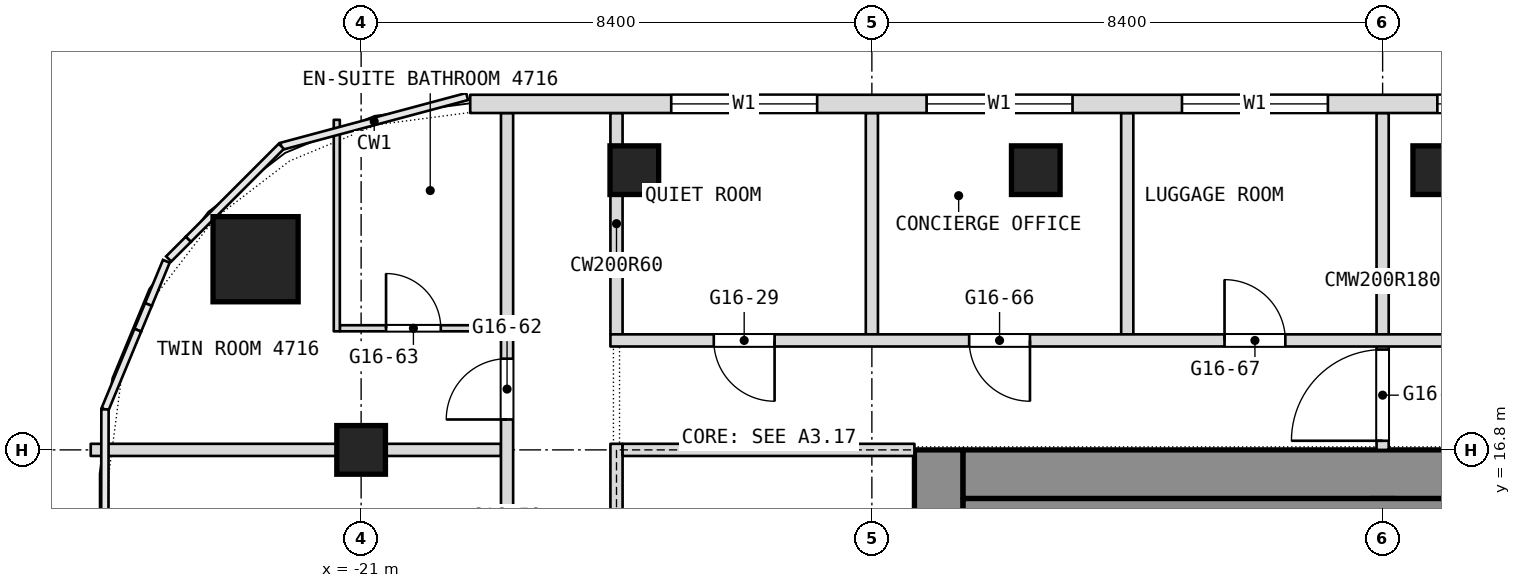
"""IFC4 building model, lengths in metres.
Left out: names, types, materials, properties, quantities, classifications, styles, units other than length and angle.
Written with IfcOpenShell. Run it as: python <this file> out.ifc"""

import sys

from ifc_helpers import new_model, si_unit, direction, frame, frame_2d, origin, origin_2d, place, context, subcontext, project, spatial, rectangle, extrude, element, fill, save


model = new_model("IFC4")
c1 = context("Model", 3, precision=1e-05, world=origin(), true_north=direction((0.0, 1.0)))
c2 = subcontext(c1, "Body", "Model", "MODEL_VIEW")
j1 = project(units=[si_unit("LENGTHUNIT", "METRE"), si_unit("PLANEANGLEUNIT", "RADIAN")], contexts=[c1])
p1 = place(None, origin())
s1 = spatial("IfcSite", under=j1, at=p1, CompositionType="ELEMENT")
p2 = place(p1, origin())
s2 = spatial("IfcBuilding", under=s1, at=p2, CompositionType="ELEMENT")
p3 = place(p2, frame((0.0, 0.0, 205.7)))
s3 = spatial("IfcBuildingStorey", under=s2, at=p3, CompositionType="ELEMENT", Elevation=205.7)
p4 = place(p3, frame((-11.5, 0.0, 0.0), z_axis=(0.0, 0.0, 1.0), x_axis=(0.0, 1.0, 0.0)))
e1 = element("IfcWall", 1, at=p4, inside=s3, PredefinedType="SHEAR", context=c2, shape_type="SweptSolid", body=[
    extrude(rectangle(XDim=16.8, YDim=0.8, at=frame_2d((8.4, 0.0))), origin(), (0.0, 0.0, 1.0), 3.6),
])
p5 = place(p4, frame((3.6, 0.0, 0.0)))
e2 = element("IfcOpeningElement", 2, at=p5, cuts=e1, PredefinedType="OPENING", context=c2, shape_type="SweptSolid", body=[
    extrude(rectangle(XDim=0.9, YDim=2.1, at=frame_2d((0.45, 1.05))), frame((0.0, 0.4, 0.0), z_axis=(0.0, -1.0, 0.0), x_axis=(1.0, 0.0, 0.0)), (0.0, 0.0, 1.0), 0.8),
])
p6 = place(p4, frame((6.825, 0.0, 0.0)))
e3 = element("IfcOpeningElement", 3, at=p6, cuts=e1, PredefinedType="OPENING", context=c2, shape_type="SweptSolid", body=[
    extrude(rectangle(XDim=1.2, YDim=2.1, at=frame_2d((0.6, 1.05))), frame((0.0, 0.4, 0.0), z_axis=(0.0, -1.0, 0.0), x_axis=(1.0, 0.0, 0.0)), (0.0, 0.0, 1.0), 0.8),
])
p7 = place(p4, frame((14.062, 0.0, 0.0)))
e4 = element("IfcOpeningElement", 4, at=p7, cuts=e1, PredefinedType="OPENING", context=c2, shape_type="SweptSolid", body=[
    extrude(rectangle(XDim=0.9, YDim=2.1, at=frame_2d((0.45, 1.05))), frame((0.0, 0.4, 0.0), z_axis=(0.0, -1.0, 0.0), x_axis=(1.0, 0.0, 0.0)), (0.0, 0.0, 1.0), 0.8),
])
p8 = place(p4, frame((11.438, 0.0, 0.0)))
e5 = element("IfcOpeningElement", 5, at=p8, cuts=e1, PredefinedType="OPENING", context=c2, shape_type="SweptSolid", body=[
    extrude(rectangle(XDim=0.9, YDim=2.1, at=frame_2d((0.45, 1.05))), frame((0.0, 0.4, 0.0), z_axis=(0.0, -1.0, 0.0), x_axis=(1.0, 0.0, 0.0)), (0.0, 0.0, 1.0), 0.8),
])
p9 = place(p4, frame((8.775, 0.0, 0.0)))
e6 = element("IfcOpeningElement", 6, at=p9, cuts=e1, PredefinedType="OPENING", context=c2, shape_type="SweptSolid", body=[
    extrude(rectangle(XDim=1.2, YDim=2.1, at=frame_2d((0.6, 1.05))), frame((0.0, 0.4, 0.0), z_axis=(0.0, -1.0, 0.0), x_axis=(1.0, 0.0, 0.0)), (0.0, 0.0, 1.0), 0.8),
])
p10 = place(p3, frame((-11.1, 16.4, 0.0), z_axis=(0.0, 0.0, 1.0), x_axis=(1.0, 0.0, 0.0)))
e7 = element("IfcWall", 7, at=p10, inside=s3, PredefinedType="SHEAR", context=c2, shape_type="SweptSolid", body=[
    extrude(rectangle(XDim=22.2, YDim=0.8, at=frame_2d((11.1, 0.0))), origin(), (0.0, 0.0, 1.0), 3.6),
])
p11 = place(p3, frame((-4.2, 0.8, 0.0), z_axis=(0.0, 0.0, 1.0), x_axis=(0.0, 1.0, 0.0)))
e8 = element("IfcWall", 8, at=p11, inside=s3, PredefinedType="SHEAR", context=c2, shape_type="SweptSolid", body=[
    extrude(rectangle(XDim=15.2, YDim=0.4, at=frame_2d((7.6, 0.0))), origin(), (0.0, 0.0, 1.0), 3.6),
])
p12 = place(p11, frame((8.5, 0.0, 0.0)))
e9 = element("IfcOpeningElement", 9, at=p12, cuts=e8, PredefinedType="OPENING", context=c2, shape_type="SweptSolid", body=[
    extrude(rectangle(XDim=1.2, YDim=2.1, at=frame_2d((0.6, 1.05))), frame((0.0, 0.2, 0.0), z_axis=(0.0, -1.0, 0.0), x_axis=(1.0, 0.0, 0.0)), (0.0, 0.0, 1.0), 0.4),
])
p13 = place(p3, frame((-22.736, 19.936, 0.0), z_axis=(0.0, 0.0, 1.0), x_axis=(1.0, 0.0, 0.0)))
e10 = element("IfcColumn", 10, at=p13, inside=s3, PredefinedType="COLUMN", context=c2, shape_type="SweptSolid", body=[
    extrude(rectangle(XDim=1.4, YDim=1.4, at=origin_2d()), origin(), (0.0, 0.0, 1.0), 3.6),
])
for number, where, z_axis, x_axis in (
    (11, (-21.0, 16.8, 0.0), (0.0, 0.0, 1.0), (1.0, 0.0, 0.0)),
    (12, (-16.507, 21.4, 0.0), (0.0, 0.0, 1.0), (1.0, 0.0, 0.0)),
    (13, (-9.904, 21.4, 0.0), (0.0, 0.0, 1.0), (1.0, 0.0, 0.0)),
    (14, (-3.302, 21.4, 0.0), (0.0, 0.0, 1.0), (1.0, 0.0, 0.0)),
):
    element("IfcColumn", number, at=place(p3, frame(where, z_axis=z_axis, x_axis=x_axis)), inside=s3, PredefinedType="COLUMN", context=c2, shape_type="SweptSolid", body=[
        extrude(rectangle(XDim=0.8, YDim=0.8, at=origin_2d()), origin(), (0.0, 0.0, 1.0), 3.6),
    ])
p14 = place(p3, frame((-4.2, 16.8, 0.0), z_axis=(0.0, 0.0, 1.0), x_axis=(0.0, 1.0, 0.0)))
e15 = element("IfcWall", 15, at=p14, inside=s3, PredefinedType="PARTITIONING", context=c2, shape_type="SweptSolid", body=[
    extrude(rectangle(XDim=5.54, YDim=0.2, at=frame_2d((2.77, 0.0))), origin(), (0.0, 0.0, 1.0), 3.34),
])
p15 = place(p14, frame((0.15, 0.0, 0.0)))
e16 = element("IfcOpeningElement", 16, at=p15, cuts=e15, PredefinedType="OPENING", context=c2, shape_type="SweptSolid", body=[
    extrude(rectangle(XDim=1.5, YDim=2.1, at=frame_2d((0.75, 1.05))), frame((0.0, 0.1, 0.0), z_axis=(0.0, -1.0, 0.0), x_axis=(1.0, 0.0, 0.0)), (0.0, 0.0, 1.0), 0.2),
])
for number, where, z_axis, x_axis in (
    (17, (-8.4, 18.7, 0.0), (0.0, 0.0, 1.0), (0.0, 1.0, 0.0)),
    (18, (-12.6, 18.7, 0.0), (0.0, 0.0, 1.0), (0.0, 1.0, 0.0)),
    (19, (-16.8, 18.7, 0.0), (0.0, 0.0, 1.0), (0.0, 1.0, 0.0)),
):
    element("IfcWall", number, at=place(p3, frame(where, z_axis=z_axis, x_axis=x_axis)), inside=s3, PredefinedType="PARTITIONING", context=c2, shape_type="SweptSolid", body=[
        extrude(rectangle(XDim=3.64, YDim=0.2, at=frame_2d((1.82, 0.0))), origin(), (0.0, 0.0, 1.0), 3.34),
    ])
p16 = place(p3, frame((-25.447, 16.8, 0.0), z_axis=(0.0, 0.0, 1.0), x_axis=(1.0, 0.0, 0.0)))
e20 = element("IfcWall", 20, at=p16, inside=s3, PredefinedType="PARTITIONING", context=c2, shape_type="SweptSolid", body=[
    extrude(rectangle(XDim=6.747, YDim=0.2, at=frame_2d((3.374, 0.0))), origin(), (0.0, 0.0, 1.0), 2.94),
])
p17 = place(p3, frame((-18.6, -26.751, 0.0), z_axis=(0.0, 0.0, 1.0), x_axis=(0.0, 1.0, 0.0)))
e21 = element("IfcWall", 21, at=p17, inside=s3, PredefinedType="PARTITIONING", context=c2, shape_type="SweptSolid", body=[
    extrude(rectangle(XDim=49.091, YDim=0.2, at=frame_2d((24.545, 0.0))), origin(), (0.0, 0.0, 1.0), 3.34),
])
p18 = place(p17, frame((4.576, 0.0, 0.0)))
e22 = element("IfcOpeningElement", 22, at=p18, cuts=e21, PredefinedType="OPENING", context=c2, shape_type="SweptSolid", body=[
    extrude(rectangle(XDim=1.1, YDim=2.1, at=frame_2d((0.55, 1.05))), frame((0.0, 0.1, 0.0), z_axis=(0.0, -1.0, 0.0), x_axis=(1.0, 0.0, 0.0)), (0.0, 0.0, 1.0), 0.2),
])
p19 = place(p17, frame((10.351, 0.0, 0.0)))
e23 = element("IfcOpeningElement", 23, at=p19, cuts=e21, PredefinedType="OPENING", context=c2, shape_type="SweptSolid", body=[
    extrude(rectangle(XDim=1.0, YDim=2.1, at=frame_2d((0.5, 1.05))), frame((0.0, 0.1, 0.0), z_axis=(0.0, -1.0, 0.0), x_axis=(1.0, 0.0, 0.0)), (0.0, 0.0, 1.0), 0.2),
])
p20 = place(p17, frame((16.951, 0.0, 0.0)))
e24 = element("IfcOpeningElement", 24, at=p20, cuts=e21, PredefinedType="OPENING", context=c2, shape_type="SweptSolid", body=[
    extrude(rectangle(XDim=1.0, YDim=2.1, at=frame_2d((0.5, 1.05))), frame((0.0, 0.1, 0.0), z_axis=(0.0, -1.0, 0.0), x_axis=(1.0, 0.0, 0.0)), (0.0, 0.0, 1.0), 0.2),
])
p21 = place(p17, frame((22.051, 0.0, 0.0)))
e25 = element("IfcOpeningElement", 25, at=p21, cuts=e21, PredefinedType="OPENING", context=c2, shape_type="SweptSolid", body=[
    extrude(rectangle(XDim=1.1, YDim=2.1, at=frame_2d((0.55, 1.05))), frame((0.0, 0.1, 0.0), z_axis=(0.0, -1.0, 0.0), x_axis=(1.0, 0.0, 0.0)), (0.0, 0.0, 1.0), 0.2),
])
p22 = place(p17, frame((30.351, 0.0, 0.0)))
e26 = element("IfcOpeningElement", 26, at=p22, cuts=e21, PredefinedType="OPENING", context=c2, shape_type="SweptSolid", body=[
    extrude(rectangle(XDim=1.1, YDim=2.1, at=frame_2d((0.55, 1.05))), frame((0.0, 0.1, 0.0), z_axis=(0.0, -1.0, 0.0), x_axis=(1.0, 0.0, 0.0)), (0.0, 0.0, 1.0), 0.2),
])
p23 = place(p17, frame((40.901, 0.0, 0.0)))
e27 = element("IfcOpeningElement", 27, at=p23, cuts=e21, PredefinedType="OPENING", context=c2, shape_type="SweptSolid", body=[
    extrude(rectangle(XDim=1.1, YDim=2.1, at=frame_2d((0.55, 1.05))), frame((0.0, 0.1, 0.0), z_axis=(0.0, -1.0, 0.0), x_axis=(1.0, 0.0, 0.0)), (0.0, 0.0, 1.0), 0.2),
])
p24 = place(p17, frame((44.051, 0.0, 0.0)))
e28 = element("IfcOpeningElement", 28, at=p24, cuts=e21, PredefinedType="OPENING", context=c2, shape_type="SweptSolid", body=[
    extrude(rectangle(XDim=1.0, YDim=2.1, at=frame_2d((0.5, 1.05))), frame((0.0, 0.1, 0.0), z_axis=(0.0, -1.0, 0.0), x_axis=(1.0, 0.0, 0.0)), (0.0, 0.0, 1.0), 0.2),
])
p25 = place(p3, frame((-16.9, 18.6, 0.0), z_axis=(0.0, 0.0, 1.0), x_axis=(1.0, 0.0, 0.0)))
e29 = element("IfcWall", 29, at=p25, inside=s3, PredefinedType="PARTITIONING", context=c2, shape_type="SweptSolid", body=[
    extrude(rectangle(XDim=33.8, YDim=0.2, at=frame_2d((16.9, 0.0))), origin(), (0.0, 0.0, 1.0), 3.34),
])
p26 = place(p25, frame((1.7, 0.0, 0.0)))
e30 = element("IfcOpeningElement", 30, at=p26, cuts=e29, PredefinedType="OPENING", context=c2, shape_type="SweptSolid", body=[
    extrude(rectangle(XDim=1.0, YDim=2.1, at=frame_2d((0.5, 1.05))), frame((0.0, 0.1, 0.0), z_axis=(0.0, -1.0, 0.0), x_axis=(1.0, 0.0, 0.0)), (0.0, 0.0, 1.0), 0.2),
])
p27 = place(p25, frame((16.0, 0.0, 0.0)))
e31 = element("IfcOpeningElement", 31, at=p27, cuts=e29, PredefinedType="OPENING", context=c2, shape_type="SweptSolid", body=[
    extrude(rectangle(XDim=1.8, YDim=2.1, at=frame_2d((0.9, 1.05))), frame((0.0, 0.1, 0.0), z_axis=(0.0, -1.0, 0.0), x_axis=(1.0, 0.0, 0.0)), (0.0, 0.0, 1.0), 0.2),
])
p28 = place(p25, frame((24.4, 0.0, 0.0)))
e32 = element("IfcOpeningElement", 32, at=p28, cuts=e29, PredefinedType="OPENING", context=c2, shape_type="SweptSolid", body=[
    extrude(rectangle(XDim=1.8, YDim=2.1, at=frame_2d((0.9, 1.05))), frame((0.0, 0.1, 0.0), z_axis=(0.0, -1.0, 0.0), x_axis=(1.0, 0.0, 0.0)), (0.0, 0.0, 1.0), 0.2),
])
p29 = place(p25, frame((31.1, 0.0, 0.0)))
e33 = element("IfcOpeningElement", 33, at=p29, cuts=e29, PredefinedType="OPENING", context=c2, shape_type="SweptSolid", body=[
    extrude(rectangle(XDim=1.0, YDim=2.1, at=frame_2d((0.5, 1.05))), frame((0.0, 0.1, 0.0), z_axis=(0.0, -1.0, 0.0), x_axis=(1.0, 0.0, 0.0)), (0.0, 0.0, 1.0), 0.2),
])
p30 = place(p25, frame((5.9, 0.0, 0.0)))
e34 = element("IfcOpeningElement", 34, at=p30, cuts=e29, PredefinedType="OPENING", context=c2, shape_type="SweptSolid", body=[
    extrude(rectangle(XDim=1.0, YDim=2.1, at=frame_2d((0.5, 1.05))), frame((0.0, 0.1, 0.0), z_axis=(0.0, -1.0, 0.0), x_axis=(1.0, 0.0, 0.0)), (0.0, 0.0, 1.0), 0.2),
])
p31 = place(p25, frame((10.1, 0.0, 0.0)))
e35 = element("IfcOpeningElement", 35, at=p31, cuts=e29, PredefinedType="OPENING", context=c2, shape_type="SweptSolid", body=[
    extrude(rectangle(XDim=1.0, YDim=2.1, at=frame_2d((0.5, 1.05))), frame((0.0, 0.1, 0.0), z_axis=(0.0, -1.0, 0.0), x_axis=(1.0, 0.0, 0.0)), (0.0, 0.0, 1.0), 0.2),
])
p32 = place(p3, frame((-21.35, 18.8, 0.0), z_axis=(0.0, 0.0, 1.0), x_axis=(1.0, 0.0, 0.0)))
e36 = element("IfcWall", 36, at=p32, inside=s3, PredefinedType="PARTITIONING", context=c2, shape_type="SweptSolid", body=[
    extrude(rectangle(XDim=2.65, YDim=0.1, at=frame_2d((1.325, 0.0))), origin(), (0.0, 0.0, 1.0), 3.34),
])
p33 = place(p32, frame((0.76, 0.0, 0.0)))
e37 = element("IfcOpeningElement", 37, at=p33, cuts=e36, PredefinedType="OPENING", context=c2, shape_type="SweptSolid", body=[
    extrude(rectangle(XDim=0.9, YDim=2.1, at=frame_2d((0.45, 1.05))), frame((0.0, 0.05, 0.0), z_axis=(0.0, -1.0, 0.0), x_axis=(1.0, 0.0, 0.0)), (0.0, 0.0, 1.0), 0.1),
])
p34 = place(p3, frame((-21.4, 18.75, 0.0), z_axis=(0.0, 0.0, 1.0), x_axis=(0.0, 1.0, 0.0)))
e38 = element("IfcWall", 38, at=p34, inside=s3, PredefinedType="PARTITIONING", context=c2, shape_type="SweptSolid", body=[
    extrude(rectangle(XDim=3.478, YDim=0.1, at=frame_2d((1.739, 0.0))), origin(), (0.0, 0.0, 1.0), 3.34),
])
p35 = place(p3, frame((19.206, 22.49, 0.0), z_axis=(0.0, 0.0, 1.0), x_axis=(-1.0, 0.0, 0.0)))
e39 = element("IfcWall", 39, at=p35, inside=s3, PredefinedType="NOTDEFINED", context=c2, shape_type="SweptSolid", body=[
    extrude(rectangle(XDim=38.412, YDim=0.3, at=frame_2d((19.206, 0.0))), origin(), (0.0, 0.0, 1.0), 3.6),
])
p36 = place(p35, frame((3.306, 0.0, 0.9)))
e40 = element("IfcOpeningElement", 40, at=p36, cuts=e39, PredefinedType="OPENING", context=c2, shape_type="SweptSolid", body=[
    extrude(rectangle(XDim=2.4, YDim=2.1, at=frame_2d((1.2, 1.05))), frame((0.0, 0.15, 0.0), z_axis=(0.0, -1.0, 0.0), x_axis=(1.0, 0.0, 0.0)), (0.0, 0.0, 1.0), 0.3),
])
p37 = place(p35, frame((7.506, 0.0, 0.9)))
e41 = element("IfcOpeningElement", 41, at=p37, cuts=e39, PredefinedType="OPENING", context=c2, shape_type="SweptSolid", body=[
    extrude(rectangle(XDim=2.4, YDim=2.1, at=frame_2d((1.2, 1.05))), frame((0.0, 0.15, 0.0), z_axis=(0.0, -1.0, 0.0), x_axis=(1.0, 0.0, 0.0)), (0.0, 0.0, 1.0), 0.3),
])
p38 = place(p35, frame((11.706, 0.0, 0.9)))
e42 = element("IfcOpeningElement", 42, at=p38, cuts=e39, PredefinedType="OPENING", context=c2, shape_type="SweptSolid", body=[
    extrude(rectangle(XDim=2.4, YDim=2.1, at=frame_2d((1.2, 1.05))), frame((0.0, 0.15, 0.0), z_axis=(0.0, -1.0, 0.0), x_axis=(1.0, 0.0, 0.0)), (0.0, 0.0, 1.0), 0.3),
])
p39 = place(p35, frame((15.906, 0.0, 0.9)))
e43 = element("IfcOpeningElement", 43, at=p39, cuts=e39, PredefinedType="OPENING", context=c2, shape_type="SweptSolid", body=[
    extrude(rectangle(XDim=2.4, YDim=2.1, at=frame_2d((1.2, 1.05))), frame((0.0, 0.15, 0.0), z_axis=(0.0, -1.0, 0.0), x_axis=(1.0, 0.0, 0.0)), (0.0, 0.0, 1.0), 0.3),
])
p40 = place(p35, frame((20.106, 0.0, 0.9)))
e44 = element("IfcOpeningElement", 44, at=p40, cuts=e39, PredefinedType="OPENING", context=c2, shape_type="SweptSolid", body=[
    extrude(rectangle(XDim=2.4, YDim=2.1, at=frame_2d((1.2, 1.05))), frame((0.0, 0.15, 0.0), z_axis=(0.0, -1.0, 0.0), x_axis=(1.0, 0.0, 0.0)), (0.0, 0.0, 1.0), 0.3),
])
p41 = place(p35, frame((24.306, 0.0, 0.9)))
e45 = element("IfcOpeningElement", 45, at=p41, cuts=e39, PredefinedType="OPENING", context=c2, shape_type="SweptSolid", body=[
    extrude(rectangle(XDim=2.4, YDim=2.1, at=frame_2d((1.2, 1.05))), frame((0.0, 0.15, 0.0), z_axis=(0.0, -1.0, 0.0), x_axis=(1.0, 0.0, 0.0)), (0.0, 0.0, 1.0), 0.3),
])
p42 = place(p35, frame((28.506, 0.0, 0.9)))
e46 = element("IfcOpeningElement", 46, at=p42, cuts=e39, PredefinedType="OPENING", context=c2, shape_type="SweptSolid", body=[
    extrude(rectangle(XDim=2.4, YDim=2.1, at=frame_2d((1.2, 1.05))), frame((0.0, 0.15, 0.0), z_axis=(0.0, -1.0, 0.0), x_axis=(1.0, 0.0, 0.0)), (0.0, 0.0, 1.0), 0.3),
])
p43 = place(p35, frame((32.706, 0.0, 0.9)))
e47 = element("IfcOpeningElement", 47, at=p43, cuts=e39, PredefinedType="OPENING", context=c2, shape_type="SweptSolid", body=[
    extrude(rectangle(XDim=2.4, YDim=2.1, at=frame_2d((1.2, 1.05))), frame((0.0, 0.15, 0.0), z_axis=(0.0, -1.0, 0.0), x_axis=(1.0, 0.0, 0.0)), (0.0, 0.0, 1.0), 0.3),
])
p44 = place(p3, frame((-11.1, 15.65, 0.0), z_axis=(0.0, 0.0, 1.0), x_axis=(1.0, 0.0, 0.0)))
e48 = element("IfcWall", 48, at=p44, inside=s3, PredefinedType="PARTITIONING", context=c2, shape_type="SweptSolid", body=[
    extrude(rectangle(XDim=22.2, YDim=0.7, at=frame_2d((11.1, 0.0))), origin(), (0.0, 0.0, 1.0), 3.34),
])
p45 = place(p3, frame((-16.8, -0.1, 0.0), z_axis=(0.0, 0.0, 1.0), x_axis=(0.0, 1.0, 0.0)))
e49 = element("IfcWall", 49, at=p45, inside=s3, PredefinedType="PARTITIONING", context=c2, shape_type="SweptSolid", body=[
    extrude(rectangle(XDim=17.0, YDim=0.2, at=frame_2d((8.5, 0.0))), origin(), (0.0, 0.0, 1.0), 3.34),
])
p46 = place(p45, frame((2.2, 0.0, 0.0)))
e50 = element("IfcOpeningElement", 50, at=p46, cuts=e49, PredefinedType="OPENING", context=c2, shape_type="SweptSolid", body=[
    extrude(rectangle(XDim=1.8, YDim=2.1, at=frame_2d((0.9, 1.05))), frame((0.0, 0.1, 0.0), z_axis=(0.0, -1.0, 0.0), x_axis=(1.0, 0.0, 0.0)), (0.0, 0.0, 1.0), 0.2),
])
p47 = place(p45, frame((13.0, 0.0, 0.0)))
e51 = element("IfcOpeningElement", 51, at=p47, cuts=e49, PredefinedType="OPENING", context=c2, shape_type="SweptSolid", body=[
    extrude(rectangle(XDim=1.8, YDim=2.1, at=frame_2d((0.9, 1.05))), frame((0.0, 0.1, 0.0), z_axis=(0.0, -1.0, 0.0), x_axis=(1.0, 0.0, 0.0)), (0.0, 0.0, 1.0), 0.2),
])
p48 = place(p3, frame((-16.7, 16.8, 0.0), z_axis=(0.0, 0.0, 1.0), x_axis=(1.0, 0.0, 0.0)))
e52 = element("IfcWall", 52, at=p48, inside=s3, PredefinedType="PARTITIONING", context=c2, shape_type="SweptSolid", body=[
    extrude(rectangle(XDim=4.8, YDim=0.2, at=frame_2d((2.4, 0.0))), origin(), (0.0, 0.0, 1.0), 2.94),
])
p49 = place(p24, origin())
e53 = element("IfcDoor", 53, at=p49, inside=s3, OperationType="SINGLE_SWING_LEFT", PredefinedType="DOOR", context=c2, shape_type="SweptSolid", body=[
    extrude(rectangle(XDim=1.0, YDim=2.1, at=frame_2d((0.5, 1.05))), frame((0.0, 0.025, 0.0), z_axis=(0.0, -1.0, 0.0), x_axis=(1.0, 0.0, 0.0)), (0.0, 0.0, 1.0), 0.05),
])
fill(e28, e53)
p50 = place(p26, origin())
e54 = element("IfcDoor", 54, at=p50, inside=s3, OperationType="SINGLE_SWING_LEFT", PredefinedType="DOOR", context=c2, shape_type="SweptSolid", body=[
    extrude(rectangle(XDim=1.0, YDim=2.1, at=frame_2d((0.5, 1.05))), frame((0.0, 0.025, 0.0), z_axis=(0.0, -1.0, 0.0), x_axis=(1.0, 0.0, 0.0)), (0.0, 0.0, 1.0), 0.05),
])
fill(e30, e54)
p51 = place(p30, origin())
e55 = element("IfcDoor", 55, at=p51, inside=s3, OperationType="SINGLE_SWING_RIGHT", PredefinedType="DOOR", context=c2, shape_type="SweptSolid", body=[
    extrude(rectangle(XDim=1.0, YDim=2.1, at=frame_2d((0.5, 1.05))), frame((0.0, 0.025, 0.0), z_axis=(0.0, -1.0, 0.0), x_axis=(1.0, 0.0, 0.0)), (0.0, 0.0, 1.0), 0.05),
])
fill(e34, e55)
p52 = place(p31, origin())
e56 = element("IfcDoor", 56, at=p52, inside=s3, OperationType="SINGLE_SWING_LEFT", PredefinedType="DOOR", context=c2, shape_type="SweptSolid", body=[
    extrude(rectangle(XDim=1.0, YDim=2.1, at=frame_2d((0.5, 1.05))), frame((0.0, 0.025, 0.0), z_axis=(0.0, -1.0, 0.0), x_axis=(1.0, 0.0, 0.0)), (0.0, 0.0, 1.0), 0.05),
])
fill(e35, e56)
p53 = place(p33, origin())
e57 = element("IfcDoor", 57, at=p53, inside=s3, OperationType="SINGLE_SWING_LEFT", PredefinedType="DOOR", context=c2, shape_type="SweptSolid", body=[
    extrude(rectangle(XDim=0.9, YDim=2.1, at=frame_2d((0.45, 1.05))), frame((0.0, 0.025, 0.0), z_axis=(0.0, -1.0, 0.0), x_axis=(1.0, 0.0, 0.0)), (0.0, 0.0, 1.0), 0.05),
])
fill(e37, e57)
p54 = place(p40, origin())
e58 = element("IfcWindow", 58, at=p54, inside=s3, PartitioningType="SINGLE_PANEL", PredefinedType="WINDOW", context=c2, shape_type="SweptSolid", body=[
    extrude(rectangle(XDim=2.4, YDim=2.1, at=frame_2d((1.2, 1.05))), frame((0.0, 0.03, 0.0), z_axis=(0.0, -1.0, 0.0), x_axis=(1.0, 0.0, 0.0)), (0.0, 0.0, 1.0), 0.06),
])
fill(e44, e58)
p55 = place(p41, origin())
e59 = element("IfcWindow", 59, at=p55, inside=s3, PartitioningType="SINGLE_PANEL", PredefinedType="WINDOW", context=c2, shape_type="SweptSolid", body=[
    extrude(rectangle(XDim=2.4, YDim=2.1, at=frame_2d((1.2, 1.05))), frame((0.0, 0.03, 0.0), z_axis=(0.0, -1.0, 0.0), x_axis=(1.0, 0.0, 0.0)), (0.0, 0.0, 1.0), 0.06),
])
fill(e45, e59)
p56 = place(p42, origin())
e60 = element("IfcWindow", 60, at=p56, inside=s3, PartitioningType="SINGLE_PANEL", PredefinedType="WINDOW", context=c2, shape_type="SweptSolid", body=[
    extrude(rectangle(XDim=2.4, YDim=2.1, at=frame_2d((1.2, 1.05))), frame((0.0, 0.03, 0.0), z_axis=(0.0, -1.0, 0.0), x_axis=(1.0, 0.0, 0.0)), (0.0, 0.0, 1.0), 0.06),
])
fill(e46, e60)
p57 = place(p43, origin())
e61 = element("IfcWindow", 61, at=p57, inside=s3, PartitioningType="SINGLE_PANEL", PredefinedType="WINDOW", context=c2, shape_type="SweptSolid", body=[
    extrude(rectangle(XDim=2.4, YDim=2.1, at=frame_2d((1.2, 1.05))), frame((0.0, 0.03, 0.0), z_axis=(0.0, -1.0, 0.0), x_axis=(1.0, 0.0, 0.0)), (0.0, 0.0, 1.0), 0.06),
])
fill(e47, e61)
p58 = place(p15, origin())
e62 = element("IfcDoor", 62, at=p58, inside=s3, OperationType="DOUBLE_DOOR_DOUBLE_SWING", PredefinedType="DOOR", context=c2, shape_type="SweptSolid", body=[
    extrude(rectangle(XDim=1.5, YDim=2.1, at=frame_2d((0.75, 1.05))), frame((0.0, 0.025, 0.0), z_axis=(0.0, -1.0, 0.0), x_axis=(1.0, 0.0, 0.0)), (0.0, 0.0, 1.0), 0.05),
])
fill(e16, e62)
save(model, sys.argv[1])
